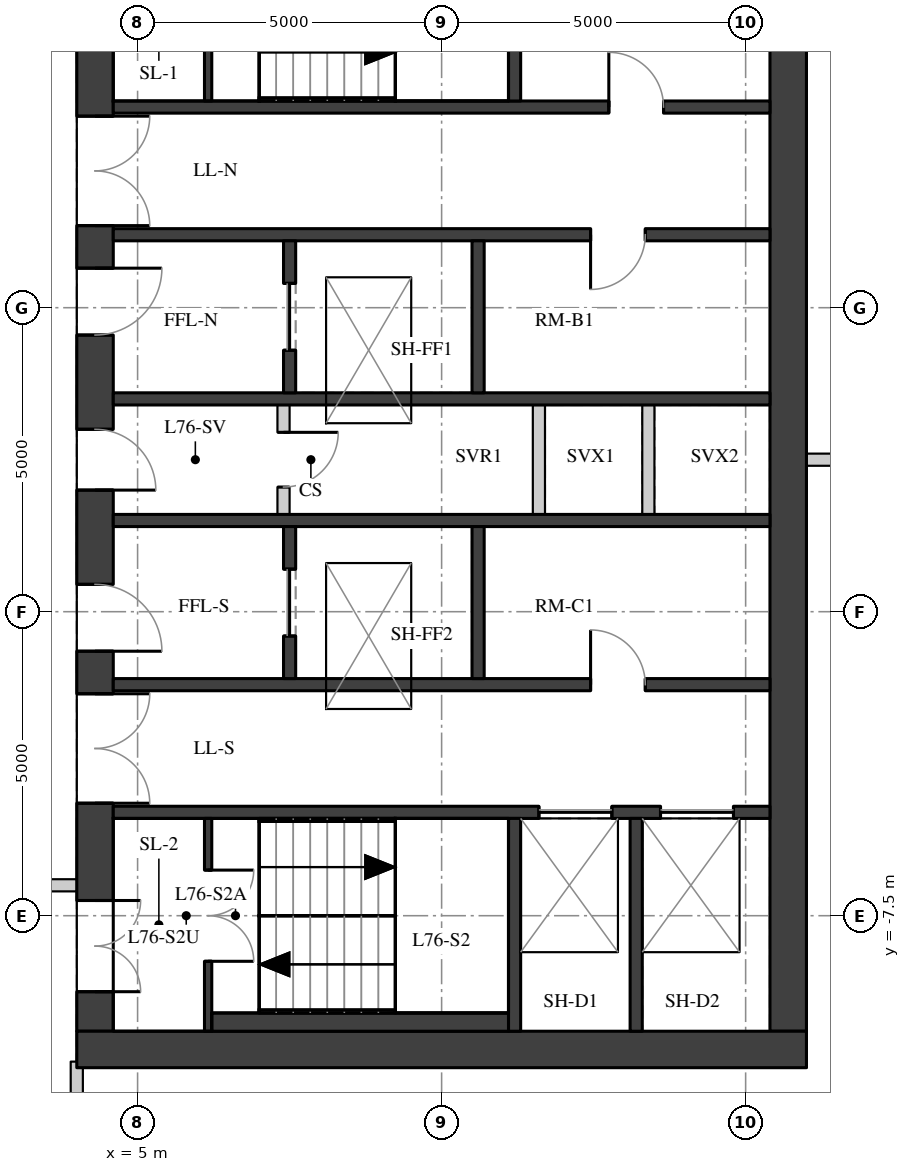
"""IFC4 building model, lengths in metres.
Left out: names, types, materials, properties, quantities, classifications, styles, units other than length and angle.
Written with IfcOpenShell. Run it as: python <this file> out.ifc"""

import sys

from ifc_helpers import new_model, si_unit, direction, frame, frame_2d, origin, place, context, subcontext, project, spatial, rectangle, extrude, element, fill, save


model = new_model("IFC4")
c1 = context("Model", 3, precision=1e-05, world=origin(), true_north=direction((0.0, 1.0)))
c2 = subcontext(c1, "Body", "Model", "MODEL_VIEW")
j1 = project(units=[si_unit("LENGTHUNIT", "METRE"), si_unit("PLANEANGLEUNIT", "RADIAN")], contexts=[c1])
p1 = place(None, origin())
s1 = spatial("IfcSite", under=j1, at=p1, CompositionType="ELEMENT")
p2 = place(p1, origin())
s2 = spatial("IfcBuilding", under=s1, at=p2, CompositionType="ELEMENT")
p3 = place(p2, frame((0.0, 0.0, 269.2)))
s3 = spatial("IfcBuildingStorey", under=s2, at=p3, CompositionType="ELEMENT", Elevation=269.2)
p4 = place(p3, frame((4.3, -9.4, 0.0), z_axis=(0.0, 0.0, 1.0), x_axis=(0.0, 1.0, 0.0)))
e1 = element("IfcWall", 1, at=p4, inside=s3, PredefinedType="SHEAR", context=c2, shape_type="SweptSolid", body=[
    extrude(rectangle(XDim=18.8, YDim=0.6, at=frame_2d((9.4, 0.0))), origin(), (0.0, 0.0, 1.0), 5.7),
])
p5 = place(p4, frame((0.65, 0.0, 0.0)))
e2 = element("IfcOpeningElement", 2, at=p5, cuts=e1, PredefinedType="OPENING", context=c2, shape_type="SweptSolid", body=[
    extrude(rectangle(XDim=1.5, YDim=2.1, at=frame_2d((0.75, 1.05))), frame((0.0, 0.31, 0.0), z_axis=(0.0, -1.0, 0.0), x_axis=(1.0, 0.0, 0.0)), (0.0, 0.0, 1.0), 0.62),
])
p6 = place(p4, frame((3.75, 0.0, 0.0)))
e3 = element("IfcOpeningElement", 3, at=p6, cuts=e1, PredefinedType="OPENING", context=c2, shape_type="SweptSolid", body=[
    extrude(rectangle(XDim=1.8, YDim=2.1, at=frame_2d((0.9, 1.05))), frame((0.0, 0.31, 0.0), z_axis=(0.0, -1.0, 0.0), x_axis=(1.0, 0.0, 0.0)), (0.0, 0.0, 1.0), 0.62),
])
p7 = place(p4, frame((6.25, 0.0, 0.0)))
e4 = element("IfcOpeningElement", 4, at=p7, cuts=e1, PredefinedType="OPENING", context=c2, shape_type="SweptSolid", body=[
    extrude(rectangle(XDim=1.1, YDim=2.1, at=frame_2d((0.55, 1.05))), frame((0.0, 0.31, 0.0), z_axis=(0.0, -1.0, 0.0), x_axis=(1.0, 0.0, 0.0)), (0.0, 0.0, 1.0), 0.62),
])
p8 = place(p4, frame((8.9, 0.0, 0.0)))
e5 = element("IfcOpeningElement", 5, at=p8, cuts=e1, PredefinedType="OPENING", context=c2, shape_type="SweptSolid", body=[
    extrude(rectangle(XDim=1.0, YDim=2.1, at=frame_2d((0.5, 1.05))), frame((0.0, 0.31, 0.0), z_axis=(0.0, -1.0, 0.0), x_axis=(1.0, 0.0, 0.0)), (0.0, 0.0, 1.0), 0.62),
])
p9 = place(p4, frame((11.45, 0.0, 0.0)))
e6 = element("IfcOpeningElement", 6, at=p9, cuts=e1, PredefinedType="OPENING", context=c2, shape_type="SweptSolid", body=[
    extrude(rectangle(XDim=1.1, YDim=2.1, at=frame_2d((0.55, 1.05))), frame((0.0, 0.31, 0.0), z_axis=(0.0, -1.0, 0.0), x_axis=(1.0, 0.0, 0.0)), (0.0, 0.0, 1.0), 0.62),
])
p10 = place(p4, frame((13.25, 0.0, 0.0)))
e7 = element("IfcOpeningElement", 7, at=p10, cuts=e1, PredefinedType="OPENING", context=c2, shape_type="SweptSolid", body=[
    extrude(rectangle(XDim=1.8, YDim=2.1, at=frame_2d((0.9, 1.05))), frame((0.0, 0.31, 0.0), z_axis=(0.0, -1.0, 0.0), x_axis=(1.0, 0.0, 0.0)), (0.0, 0.0, 1.0), 0.62),
])
p11 = place(p4, frame((16.65, 0.0, 0.0)))
e8 = element("IfcOpeningElement", 8, at=p11, cuts=e1, PredefinedType="OPENING", context=c2, shape_type="SweptSolid", body=[
    extrude(rectangle(XDim=1.5, YDim=2.1, at=frame_2d((0.75, 1.05))), frame((0.0, 0.31, 0.0), z_axis=(0.0, -1.0, 0.0), x_axis=(1.0, 0.0, 0.0)), (0.0, 0.0, 1.0), 0.62),
])
p12 = place(p3, frame((15.7, -9.4, 0.0), z_axis=(0.0, 0.0, 1.0), x_axis=(0.0, 1.0, 0.0)))
e9 = element("IfcWall", 9, at=p12, inside=s3, PredefinedType="SHEAR", context=c2, shape_type="SweptSolid", body=[
    extrude(rectangle(XDim=18.8, YDim=0.6, at=frame_2d((9.4, 0.0))), origin(), (0.0, 0.0, 1.0), 5.7),
])
p13 = place(p3, frame((4.0, -9.7, 0.0), z_axis=(0.0, 0.0, 1.0), x_axis=(1.0, 0.0, 0.0)))
e10 = element("IfcWall", 10, at=p13, inside=s3, PredefinedType="SHEAR", context=c2, shape_type="SweptSolid", body=[
    extrude(rectangle(XDim=12.0, YDim=0.6, at=frame_2d((6.0, 0.0))), origin(), (0.0, 0.0, 1.0), 5.7),
])
p14 = place(p3, frame((4.6, 5.8, 0.0), z_axis=(0.0, 0.0, 1.0), x_axis=(1.0, 0.0, 0.0)))
e11 = element("IfcWall", 11, at=p14, inside=s3, PredefinedType="SHEAR", context=c2, shape_type="SweptSolid", body=[
    extrude(rectangle(XDim=10.8, YDim=0.2, at=frame_2d((5.4, 0.0))), origin(), (0.0, 0.0, 1.0), 5.7),
])
p15 = place(p14, frame((8.15, 0.0, 0.0)))
e12 = element("IfcOpeningElement", 12, at=p15, cuts=e11, PredefinedType="OPENING", context=c2, shape_type="SweptSolid", body=[
    extrude(rectangle(XDim=0.9, YDim=2.1, at=frame_2d((0.45, 1.05))), frame((0.0, 0.11, 0.0), z_axis=(0.0, -1.0, 0.0), x_axis=(1.0, 0.0, 0.0)), (0.0, 0.0, 1.0), 0.22),
])
p16 = place(p3, frame((4.6, 3.7, 0.0), z_axis=(0.0, 0.0, 1.0), x_axis=(1.0, 0.0, 0.0)))
e13 = element("IfcWall", 13, at=p16, inside=s3, PredefinedType="SHEAR", context=c2, shape_type="SweptSolid", body=[
    extrude(rectangle(XDim=10.8, YDim=0.2, at=frame_2d((5.4, 0.0))), origin(), (0.0, 0.0, 1.0), 5.7),
])
p17 = place(p16, frame((7.85, 0.0, 0.0)))
e14 = element("IfcOpeningElement", 14, at=p17, cuts=e13, PredefinedType="OPENING", context=c2, shape_type="SweptSolid", body=[
    extrude(rectangle(XDim=0.9, YDim=2.1, at=frame_2d((0.45, 1.05))), frame((0.0, 0.11, 0.0), z_axis=(0.0, -1.0, 0.0), x_axis=(1.0, 0.0, 0.0)), (0.0, 0.0, 1.0), 0.22),
])
for number, where, z_axis, x_axis in (
    (15, (4.6, 1.0, 0.0), (0.0, 0.0, 1.0), (1.0, 0.0, 0.0)),
    (16, (4.6, -1.0, 0.0), (0.0, 0.0, 1.0), (1.0, 0.0, 0.0)),
):
    element("IfcWall", number, at=place(p3, frame(where, z_axis=z_axis, x_axis=x_axis)), inside=s3, PredefinedType="SHEAR", context=c2, shape_type="SweptSolid", body=[
        extrude(rectangle(XDim=10.8, YDim=0.2, at=frame_2d((5.4, 0.0))), origin(), (0.0, 0.0, 1.0), 5.7),
    ])
p18 = place(p3, frame((4.6, -3.7, 0.0), z_axis=(0.0, 0.0, 1.0), x_axis=(1.0, 0.0, 0.0)))
e17 = element("IfcWall", 17, at=p18, inside=s3, PredefinedType="SHEAR", context=c2, shape_type="SweptSolid", body=[
    extrude(rectangle(XDim=10.8, YDim=0.2, at=frame_2d((5.4, 0.0))), origin(), (0.0, 0.0, 1.0), 5.7),
])
p19 = place(p18, frame((7.85, 0.0, 0.0)))
e18 = element("IfcOpeningElement", 18, at=p19, cuts=e17, PredefinedType="OPENING", context=c2, shape_type="SweptSolid", body=[
    extrude(rectangle(XDim=0.9, YDim=2.1, at=frame_2d((0.45, 1.05))), frame((0.0, 0.11, 0.0), z_axis=(0.0, -1.0, 0.0), x_axis=(1.0, 0.0, 0.0)), (0.0, 0.0, 1.0), 0.22),
])
p20 = place(p3, frame((4.6, -5.8, 0.0), z_axis=(0.0, 0.0, 1.0), x_axis=(1.0, 0.0, 0.0)))
e19 = element("IfcWall", 19, at=p20, inside=s3, PredefinedType="SHEAR", context=c2, shape_type="SweptSolid", body=[
    extrude(rectangle(XDim=10.8, YDim=0.2, at=frame_2d((5.4, 0.0))), origin(), (0.0, 0.0, 1.0), 5.7),
])
p21 = place(p20, frame((7.0, 0.0, 0.0)))
e20 = element("IfcOpeningElement", 20, at=p21, cuts=e19, PredefinedType="OPENING", context=c2, shape_type="SweptSolid", body=[
    extrude(rectangle(XDim=1.2, YDim=2.1, at=frame_2d((0.6, 1.05))), frame((0.0, 0.11, 0.0), z_axis=(0.0, -1.0, 0.0), x_axis=(1.0, 0.0, 0.0)), (0.0, 0.0, 1.0), 0.22),
])
p22 = place(p20, frame((9.0, 0.0, 0.0)))
e21 = element("IfcOpeningElement", 21, at=p22, cuts=e19, PredefinedType="OPENING", context=c2, shape_type="SweptSolid", body=[
    extrude(rectangle(XDim=1.2, YDim=2.1, at=frame_2d((0.6, 1.05))), frame((0.0, 0.11, 0.0), z_axis=(0.0, -1.0, 0.0), x_axis=(1.0, 0.0, 0.0)), (0.0, 0.0, 1.0), 0.22),
])
for number, where, z_axis, x_axis in (
    (22, (11.2, 5.9, 0.0), (0.0, 0.0, 1.0), (0.0, 1.0, 0.0)),
    (23, (11.2, -9.4, 0.0), (0.0, 0.0, 1.0), (0.0, 1.0, 0.0)),
    (24, (13.2, -9.4, 0.0), (0.0, 0.0, 1.0), (0.0, 1.0, 0.0)),
):
    element("IfcWall", number, at=place(p3, frame(where, z_axis=z_axis, x_axis=x_axis)), inside=s3, PredefinedType="SHEAR", context=c2, shape_type="SweptSolid", body=[
        extrude(rectangle(XDim=3.5, YDim=0.2, at=frame_2d((1.75, 0.0))), origin(), (0.0, 0.0, 1.0), 5.7),
    ])
p23 = place(p3, frame((7.5, 1.1, 0.0), z_axis=(0.0, 0.0, 1.0), x_axis=(0.0, 1.0, 0.0)))
e25 = element("IfcWall", 25, at=p23, inside=s3, PredefinedType="SHEAR", context=c2, shape_type="SweptSolid", body=[
    extrude(rectangle(XDim=2.5, YDim=0.2, at=frame_2d((1.25, 0.0))), origin(), (0.0, 0.0, 1.0), 5.7),
])
p24 = place(p23, frame((0.7, 0.0, 0.0)))
e26 = element("IfcOpeningElement", 26, at=p24, cuts=e25, PredefinedType="OPENING", context=c2, shape_type="SweptSolid", body=[
    extrude(rectangle(XDim=1.1, YDim=2.1, at=frame_2d((0.55, 1.05))), frame((0.0, 0.11, 0.0), z_axis=(0.0, -1.0, 0.0), x_axis=(1.0, 0.0, 0.0)), (0.0, 0.0, 1.0), 0.22),
])
p25 = place(p3, frame((7.5, -3.6, 0.0), z_axis=(0.0, 0.0, 1.0), x_axis=(0.0, 1.0, 0.0)))
e27 = element("IfcWall", 27, at=p25, inside=s3, PredefinedType="SHEAR", context=c2, shape_type="SweptSolid", body=[
    extrude(rectangle(XDim=2.5, YDim=0.2, at=frame_2d((1.25, 0.0))), origin(), (0.0, 0.0, 1.0), 5.7),
])
p26 = place(p25, frame((0.7, 0.0, 0.0)))
e28 = element("IfcOpeningElement", 28, at=p26, cuts=e27, PredefinedType="OPENING", context=c2, shape_type="SweptSolid", body=[
    extrude(rectangle(XDim=1.1, YDim=2.1, at=frame_2d((0.55, 1.05))), frame((0.0, 0.11, 0.0), z_axis=(0.0, -1.0, 0.0), x_axis=(1.0, 0.0, 0.0)), (0.0, 0.0, 1.0), 0.22),
])
for number, where, z_axis, x_axis in (
    (29, (10.6, 1.1, 0.0), (0.0, 0.0, 1.0), (0.0, 1.0, 0.0)),
    (30, (10.6, -3.6, 0.0), (0.0, 0.0, 1.0), (0.0, 1.0, 0.0)),
):
    element("IfcWall", number, at=place(p3, frame(where, z_axis=z_axis, x_axis=x_axis)), inside=s3, PredefinedType="SHEAR", context=c2, shape_type="SweptSolid", body=[
        extrude(rectangle(XDim=2.5, YDim=0.2, at=frame_2d((1.25, 0.0))), origin(), (0.0, 0.0, 1.0), 5.7),
    ])
p27 = place(p3, frame((6.16, 5.9, 0.0), z_axis=(0.0, 0.0, 1.0), x_axis=(0.0, 1.0, 0.0)))
e31 = element("IfcWall", 31, at=p27, inside=s3, PredefinedType="SHEAR", context=c2, shape_type="SweptSolid", body=[
    extrude(rectangle(XDim=3.5, YDim=0.12, at=frame_2d((1.75, 0.0))), origin(), (0.0, 0.0, 1.0), 2.79),
])
p28 = place(p27, frame((0.85, 0.0, 0.0)))
e32 = element("IfcOpeningElement", 32, at=p28, cuts=e31, PredefinedType="OPENING", context=c2, shape_type="SweptSolid", body=[
    extrude(rectangle(XDim=1.5, YDim=2.1, at=frame_2d((0.75, 1.05))), frame((0.0, 0.07, 0.0), z_axis=(0.0, -1.0, 0.0), x_axis=(1.0, 0.0, 0.0)), (0.0, 0.0, 1.0), 0.14),
])
p29 = place(p3, frame((6.16, -9.4, 0.0), z_axis=(0.0, 0.0, 1.0), x_axis=(0.0, 1.0, 0.0)))
e33 = element("IfcWall", 33, at=p29, inside=s3, PredefinedType="SHEAR", context=c2, shape_type="SweptSolid", body=[
    extrude(rectangle(XDim=3.5, YDim=0.12, at=frame_2d((1.75, 0.0))), origin(), (0.0, 0.0, 1.0), 2.79),
])
p30 = place(p29, frame((1.15, 0.0, 0.0)))
e34 = element("IfcOpeningElement", 34, at=p30, cuts=e33, PredefinedType="OPENING", context=c2, shape_type="SweptSolid", body=[
    extrude(rectangle(XDim=1.5, YDim=2.1, at=frame_2d((0.75, 1.05))), frame((0.0, 0.07, 0.0), z_axis=(0.0, -1.0, 0.0), x_axis=(1.0, 0.0, 0.0)), (0.0, 0.0, 1.0), 0.14),
])
p31 = place(p3, frame((7.4, -0.9, 0.0), z_axis=(0.0, 0.0, 1.0), x_axis=(0.0, 1.0, 0.0)))
e35 = element("IfcWall", 35, at=p31, inside=s3, PredefinedType="PARTITIONING", context=c2, shape_type="SweptSolid", body=[
    extrude(rectangle(XDim=1.8, YDim=0.2, at=frame_2d((0.9, 0.0))), origin(), (0.0, 0.0, 1.0), 5.7),
])
p32 = place(p31, frame((0.45, 0.0, 0.0)))
e36 = element("IfcOpeningElement", 36, at=p32, cuts=e35, PredefinedType="OPENING", context=c2, shape_type="SweptSolid", body=[
    extrude(rectangle(XDim=0.9, YDim=2.1, at=frame_2d((0.45, 1.05))), frame((0.0, 0.11, 0.0), z_axis=(0.0, -1.0, 0.0), x_axis=(1.0, 0.0, 0.0)), (0.0, 0.0, 1.0), 0.22),
])
for number, where, z_axis, x_axis in (
    (37, (11.6, -0.9, 0.0), (0.0, 0.0, 1.0), (0.0, 1.0, 0.0)),
    (38, (13.4, -0.9, 0.0), (0.0, 0.0, 1.0), (0.0, 1.0, 0.0)),
):
    element("IfcWall", number, at=place(p3, frame(where, z_axis=z_axis, x_axis=x_axis)), inside=s3, PredefinedType="PARTITIONING", context=c2, shape_type="SweptSolid", body=[
        extrude(rectangle(XDim=1.8, YDim=0.2, at=frame_2d((0.9, 0.0))), origin(), (0.0, 0.0, 1.0), 5.7),
    ])
p33 = place(p3, frame((6.22, -9.25, 0.0), z_axis=(0.0, 0.0, 1.0), x_axis=(1.0, 0.0, 0.0)))
e39 = element("IfcWall", 39, at=p33, inside=s3, PredefinedType="PARTITIONING", context=c2, shape_type="SweptSolid", body=[
    extrude(rectangle(XDim=4.88, YDim=0.3, at=frame_2d((2.44, 0.0))), origin(), (0.0, 0.0, 1.0), 5.7),
])
p34 = place(p3, frame((-9.4, -7.0, 0.0), z_axis=(0.0, 0.0, 1.0), x_axis=(1.0, 0.0, 0.0)))
e40 = element("IfcWall", 40, at=p34, inside=s3, PredefinedType="PARTITIONING", context=c2, shape_type="SweptSolid", body=[
    extrude(rectangle(XDim=13.402, YDim=0.2, at=frame_2d((6.701, 0.0))), origin(), (0.0, 0.0, 1.0), 5.15),
])
p35 = place(p34, frame((9.001, 0.0, 0.0)))
e41 = element("IfcOpeningElement", 41, at=p35, cuts=e40, PredefinedType="OPENING", context=c2, shape_type="SweptSolid", body=[
    extrude(rectangle(XDim=1.8, YDim=2.1, at=frame_2d((0.9, 1.05))), frame((0.0, 0.11, 0.0), z_axis=(0.0, -1.0, 0.0), x_axis=(1.0, 0.0, 0.0)), (0.0, 0.0, 1.0), 0.22),
])
p36 = place(p3, frame((15.998, 0.0, 0.0), z_axis=(0.0, 0.0, 1.0), x_axis=(1.0, 0.0, 0.0)))
e42 = element("IfcWall", 42, at=p36, inside=s3, PredefinedType="PARTITIONING", context=c2, shape_type="SweptSolid", body=[
    extrude(rectangle(XDim=8.232, YDim=0.2, at=frame_2d((4.116, 0.0))), origin(), (0.0, 0.0, 1.0), 5.25),
])
p37 = place(p3, frame((4.0, -13.9, 0.0), z_axis=(0.0, 0.0, 1.0), x_axis=(0.0, 1.0, 0.0)))
e43 = element("IfcWall", 43, at=p37, inside=s3, PredefinedType="PARTITIONING", context=c2, shape_type="SweptSolid", body=[
    extrude(rectangle(XDim=4.0, YDim=0.2, at=frame_2d((2.0, 0.0))), origin(), (0.0, 0.0, 1.0), 5.7),
])
p38 = place(p5, origin())
e44 = element("IfcDoor", 44, at=p38, inside=s3, OperationType="DOUBLE_DOOR_SINGLE_SWING", PredefinedType="DOOR", context=c2, shape_type="SweptSolid", body=[
    extrude(rectangle(XDim=1.5, YDim=2.1, at=frame_2d((0.75, 1.05))), frame((0.0, 0.025, 0.0), z_axis=(0.0, -1.0, 0.0), x_axis=(1.0, 0.0, 0.0)), (0.0, 0.0, 1.0), 0.05),
])
fill(e2, e44)
p39 = place(p6, origin())
e45 = element("IfcDoor", 45, at=p39, inside=s3, OperationType="DOUBLE_DOOR_SINGLE_SWING", PredefinedType="DOOR", context=c2, shape_type="SweptSolid", body=[
    extrude(rectangle(XDim=1.8, YDim=2.1, at=frame_2d((0.9, 1.05))), frame((0.0, 0.025, 0.0), z_axis=(0.0, -1.0, 0.0), x_axis=(1.0, 0.0, 0.0)), (0.0, 0.0, 1.0), 0.05),
])
fill(e3, e45)
p40 = place(p7, origin())
e46 = element("IfcDoor", 46, at=p40, inside=s3, OperationType="SINGLE_SWING_RIGHT", PredefinedType="DOOR", context=c2, shape_type="SweptSolid", body=[
    extrude(rectangle(XDim=1.1, YDim=2.1, at=frame_2d((0.55, 1.05))), frame((0.0, 0.025, 0.0), z_axis=(0.0, -1.0, 0.0), x_axis=(1.0, 0.0, 0.0)), (0.0, 0.0, 1.0), 0.05),
])
fill(e4, e46)
p41 = place(p8, origin())
e47 = element("IfcDoor", 47, at=p41, inside=s3, OperationType="SINGLE_SWING_RIGHT", PredefinedType="DOOR", context=c2, shape_type="SweptSolid", body=[
    extrude(rectangle(XDim=1.0, YDim=2.1, at=frame_2d((0.5, 1.05))), frame((0.0, 0.025, 0.0), z_axis=(0.0, -1.0, 0.0), x_axis=(1.0, 0.0, 0.0)), (0.0, 0.0, 1.0), 0.05),
])
fill(e5, e47)
p42 = place(p9, origin())
e48 = element("IfcDoor", 48, at=p42, inside=s3, OperationType="SINGLE_SWING_LEFT", PredefinedType="DOOR", context=c2, shape_type="SweptSolid", body=[
    extrude(rectangle(XDim=1.1, YDim=2.1, at=frame_2d((0.55, 1.05))), frame((0.0, 0.025, 0.0), z_axis=(0.0, -1.0, 0.0), x_axis=(1.0, 0.0, 0.0)), (0.0, 0.0, 1.0), 0.05),
])
fill(e6, e48)
p43 = place(p10, origin())
e49 = element("IfcDoor", 49, at=p43, inside=s3, OperationType="DOUBLE_DOOR_SINGLE_SWING", PredefinedType="DOOR", context=c2, shape_type="SweptSolid", body=[
    extrude(rectangle(XDim=1.8, YDim=2.1, at=frame_2d((0.9, 1.05))), frame((0.0, 0.025, 0.0), z_axis=(0.0, -1.0, 0.0), x_axis=(1.0, 0.0, 0.0)), (0.0, 0.0, 1.0), 0.05),
])
fill(e7, e49)
p44 = place(p30, origin())
e50 = element("IfcDoor", 50, at=p44, inside=s3, OperationType="DOUBLE_DOOR_SINGLE_SWING", PredefinedType="DOOR", context=c2, shape_type="SweptSolid", body=[
    extrude(rectangle(XDim=1.5, YDim=2.1, at=frame_2d((0.75, 1.05))), frame((0.0, 0.025, 0.0), z_axis=(0.0, -1.0, 0.0), x_axis=(1.0, 0.0, 0.0)), (0.0, 0.0, 1.0), 0.05),
])
fill(e34, e50)
p45 = place(p15, origin())
e51 = element("IfcDoor", 51, at=p45, inside=s3, OperationType="SINGLE_SWING_LEFT", PredefinedType="DOOR", context=c2, shape_type="SweptSolid", body=[
    extrude(rectangle(XDim=0.9, YDim=2.1, at=frame_2d((0.45, 1.05))), frame((0.0, 0.025, 0.0), z_axis=(0.0, -1.0, 0.0), x_axis=(1.0, 0.0, 0.0)), (0.0, 0.0, 1.0), 0.05),
])
fill(e12, e51)
p46 = place(p17, origin())
e52 = element("IfcDoor", 52, at=p46, inside=s3, OperationType="SINGLE_SWING_RIGHT", PredefinedType="DOOR", context=c2, shape_type="SweptSolid", body=[
    extrude(rectangle(XDim=0.9, YDim=2.1, at=frame_2d((0.45, 1.05))), frame((0.0, 0.025, 0.0), z_axis=(0.0, -1.0, 0.0), x_axis=(1.0, 0.0, 0.0)), (0.0, 0.0, 1.0), 0.05),
])
fill(e14, e52)
p47 = place(p19, origin())
e53 = element("IfcDoor", 53, at=p47, inside=s3, OperationType="SINGLE_SWING_LEFT", PredefinedType="DOOR", context=c2, shape_type="SweptSolid", body=[
    extrude(rectangle(XDim=0.9, YDim=2.1, at=frame_2d((0.45, 1.05))), frame((0.0, 0.025, 0.0), z_axis=(0.0, -1.0, 0.0), x_axis=(1.0, 0.0, 0.0)), (0.0, 0.0, 1.0), 0.05),
])
fill(e18, e53)
p48 = place(p21, origin())
e54 = element("IfcDoor", 54, at=p48, inside=s3, OperationType="DOUBLE_DOOR_SLIDING", PredefinedType="DOOR", context=c2, shape_type="SweptSolid", body=[
    extrude(rectangle(XDim=1.2, YDim=2.1, at=frame_2d((0.6, 1.05))), frame((0.0, 0.025, 0.0), z_axis=(0.0, -1.0, 0.0), x_axis=(1.0, 0.0, 0.0)), (0.0, 0.0, 1.0), 0.05),
])
fill(e20, e54)
p49 = place(p22, origin())
e55 = element("IfcDoor", 55, at=p49, inside=s3, OperationType="DOUBLE_DOOR_SLIDING", PredefinedType="DOOR", context=c2, shape_type="SweptSolid", body=[
    extrude(rectangle(XDim=1.2, YDim=2.1, at=frame_2d((0.6, 1.05))), frame((0.0, 0.025, 0.0), z_axis=(0.0, -1.0, 0.0), x_axis=(1.0, 0.0, 0.0)), (0.0, 0.0, 1.0), 0.05),
])
fill(e21, e55)
p50 = place(p24, origin())
e56 = element("IfcDoor", 56, at=p50, inside=s3, OperationType="DOUBLE_DOOR_SLIDING", PredefinedType="DOOR", context=c2, shape_type="SweptSolid", body=[
    extrude(rectangle(XDim=1.1, YDim=2.1, at=frame_2d((0.55, 1.05))), frame((0.0, 0.025, 0.0), z_axis=(0.0, -1.0, 0.0), x_axis=(1.0, 0.0, 0.0)), (0.0, 0.0, 1.0), 0.05),
])
fill(e26, e56)
p51 = place(p26, origin())
e57 = element("IfcDoor", 57, at=p51, inside=s3, OperationType="DOUBLE_DOOR_SLIDING", PredefinedType="DOOR", context=c2, shape_type="SweptSolid", body=[
    extrude(rectangle(XDim=1.1, YDim=2.1, at=frame_2d((0.55, 1.05))), frame((0.0, 0.025, 0.0), z_axis=(0.0, -1.0, 0.0), x_axis=(1.0, 0.0, 0.0)), (0.0, 0.0, 1.0), 0.05),
])
fill(e28, e57)
p52 = place(p32, origin())
e58 = element("IfcDoor", 58, at=p52, inside=s3, OperationType="SINGLE_SWING_LEFT", PredefinedType="DOOR", context=c2, shape_type="SweptSolid", body=[
    extrude(rectangle(XDim=0.9, YDim=2.1, at=frame_2d((0.45, 1.05))), frame((0.0, 0.025, 0.0), z_axis=(0.0, -1.0, 0.0), x_axis=(1.0, 0.0, 0.0)), (0.0, 0.0, 1.0), 0.05),
])
fill(e36, e58)
save(model, sys.argv[1])
